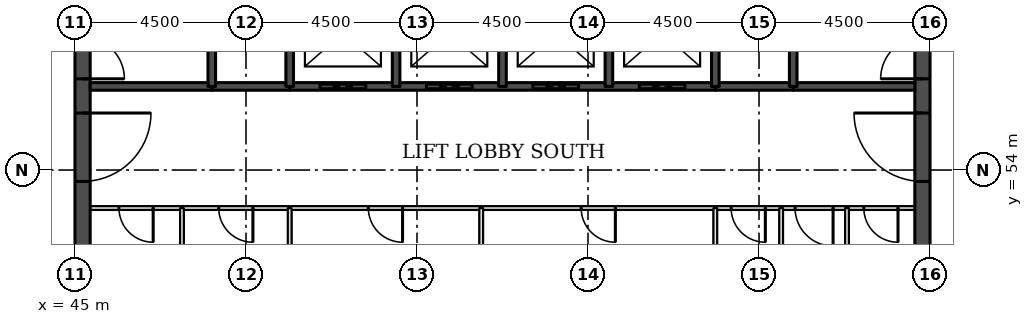
"""IFC4 building model, lengths in metres.
Left out: names, types, materials, properties, quantities, classifications, styles, units other than length and angle.
Written with IfcOpenShell. Run it as: python <this file> out.ifc"""

import sys

from ifc_helpers import new_model, si_unit, direction, frame, frame_2d, origin, place, context, subcontext, project, spatial, rectangle, extrude, element, fill, save


model = new_model("IFC4")
c1 = context("Model", 3, precision=1e-05, world=origin(), true_north=direction((0.0, 1.0)))
c2 = subcontext(c1, "Body", "Model", "MODEL_VIEW")
j1 = project(units=[si_unit("LENGTHUNIT", "METRE"), si_unit("PLANEANGLEUNIT", "RADIAN")], contexts=[c1])
p1 = place(None, origin())
s1 = spatial("IfcSite", under=j1, at=p1, CompositionType="ELEMENT")
p2 = place(p1, origin())
s2 = spatial("IfcBuilding", under=s1, at=p2, CompositionType="ELEMENT")
p3 = place(p2, frame((0.0, 0.0, 223.0)))
s3 = spatial("IfcBuildingStorey", under=s2, at=p3, CompositionType="ELEMENT", Elevation=223.0)
p4 = place(p3, frame((45.2, 49.5, 0.0), z_axis=(0.0, 0.0, 1.0), x_axis=(0.0, 1.0, 0.0)))
e1 = element("IfcWall", 1, at=p4, inside=s3, PredefinedType="SHEAR", context=c2, shape_type="SweptSolid", body=[
    extrude(rectangle(XDim=22.5, YDim=0.4, at=frame_2d((11.25, 0.0))), origin(), (0.0, 0.0, 1.0), 3.7),
])
p5 = place(p4, frame((4.2, 0.0, 0.0)))
e2 = element("IfcOpeningElement", 2, at=p5, cuts=e1, PredefinedType="OPENING", context=c2, shape_type="SweptSolid", body=[
    extrude(rectangle(XDim=1.8, YDim=2.1, at=frame_2d((0.9, 1.05))), frame((0.0, 0.21, 0.0), z_axis=(0.0, -1.0, 0.0), x_axis=(1.0, 0.0, 0.0)), (0.0, 0.0, 1.0), 0.42),
])
p6 = place(p4, frame((6.9, 0.0, 0.0)))
e3 = element("IfcOpeningElement", 3, at=p6, cuts=e1, PredefinedType="OPENING", context=c2, shape_type="SweptSolid", body=[
    extrude(rectangle(XDim=1.1, YDim=2.1, at=frame_2d((0.55, 1.05))), frame((0.0, 0.21, 0.0), z_axis=(0.0, -1.0, 0.0), x_axis=(1.0, 0.0, 0.0)), (0.0, 0.0, 1.0), 0.42),
])
p7 = place(p4, frame((13.6, 0.0, 0.0)))
e4 = element("IfcOpeningElement", 4, at=p7, cuts=e1, PredefinedType="OPENING", context=c2, shape_type="SweptSolid", body=[
    extrude(rectangle(XDim=1.1, YDim=2.1, at=frame_2d((0.55, 1.05))), frame((0.0, 0.21, 0.0), z_axis=(0.0, -1.0, 0.0), x_axis=(1.0, 0.0, 0.0)), (0.0, 0.0, 1.0), 0.42),
])
p8 = place(p4, frame((16.5, 0.0, 0.0)))
e5 = element("IfcOpeningElement", 5, at=p8, cuts=e1, PredefinedType="OPENING", context=c2, shape_type="SweptSolid", body=[
    extrude(rectangle(XDim=1.8, YDim=2.1, at=frame_2d((0.9, 1.05))), frame((0.0, 0.21, 0.0), z_axis=(0.0, -1.0, 0.0), x_axis=(1.0, 0.0, 0.0)), (0.0, 0.0, 1.0), 0.42),
])
p9 = place(p3, frame((67.3, 49.5, 0.0), z_axis=(0.0, 0.0, 1.0), x_axis=(0.0, 1.0, 0.0)))
e6 = element("IfcWall", 6, at=p9, inside=s3, PredefinedType="SHEAR", context=c2, shape_type="SweptSolid", body=[
    extrude(rectangle(XDim=22.5, YDim=0.4, at=frame_2d((11.25, 0.0))), origin(), (0.0, 0.0, 1.0), 3.7),
])
p10 = place(p9, frame((4.2, 0.0, 0.0)))
e7 = element("IfcOpeningElement", 7, at=p10, cuts=e6, PredefinedType="OPENING", context=c2, shape_type="SweptSolid", body=[
    extrude(rectangle(XDim=1.8, YDim=2.1, at=frame_2d((0.9, 1.05))), frame((0.0, 0.21, 0.0), z_axis=(0.0, -1.0, 0.0), x_axis=(1.0, 0.0, 0.0)), (0.0, 0.0, 1.0), 0.42),
])
p11 = place(p9, frame((6.9, 0.0, 0.0)))
e8 = element("IfcOpeningElement", 8, at=p11, cuts=e6, PredefinedType="OPENING", context=c2, shape_type="SweptSolid", body=[
    extrude(rectangle(XDim=1.1, YDim=2.1, at=frame_2d((0.55, 1.05))), frame((0.0, 0.21, 0.0), z_axis=(0.0, -1.0, 0.0), x_axis=(1.0, 0.0, 0.0)), (0.0, 0.0, 1.0), 0.42),
])
p12 = place(p9, frame((13.6, 0.0, 0.0)))
e9 = element("IfcOpeningElement", 9, at=p12, cuts=e6, PredefinedType="OPENING", context=c2, shape_type="SweptSolid", body=[
    extrude(rectangle(XDim=1.1, YDim=2.1, at=frame_2d((0.55, 1.05))), frame((0.0, 0.21, 0.0), z_axis=(0.0, -1.0, 0.0), x_axis=(1.0, 0.0, 0.0)), (0.0, 0.0, 1.0), 0.42),
])
p13 = place(p9, frame((16.5, 0.0, 0.0)))
e10 = element("IfcOpeningElement", 10, at=p13, cuts=e6, PredefinedType="OPENING", context=c2, shape_type="SweptSolid", body=[
    extrude(rectangle(XDim=1.8, YDim=2.1, at=frame_2d((0.9, 1.05))), frame((0.0, 0.21, 0.0), z_axis=(0.0, -1.0, 0.0), x_axis=(1.0, 0.0, 0.0)), (0.0, 0.0, 1.0), 0.42),
])
p14 = place(p3, frame((45.4, 53.0, 0.0), z_axis=(0.0, 0.0, 1.0), x_axis=(1.0, 0.0, 0.0)))
e11 = element("IfcWall", 11, at=p14, inside=s3, PredefinedType="PARTITIONING", context=c2, shape_type="SweptSolid", body=[
    extrude(rectangle(XDim=21.7, YDim=0.1, at=frame_2d((10.85, 0.0))), origin(), (0.0, 0.0, 1.0), 3.55),
])
p15 = place(p14, frame((20.357, 0.0, 0.0)))
e12 = element("IfcOpeningElement", 12, at=p15, cuts=e11, PredefinedType="OPENING", context=c2, shape_type="SweptSolid", body=[
    extrude(rectangle(XDim=0.9, YDim=2.1, at=frame_2d((0.45, 1.05))), frame((0.0, 0.06, 0.0), z_axis=(0.0, -1.0, 0.0), x_axis=(1.0, 0.0, 0.0)), (0.0, 0.0, 1.0), 0.12),
])
p16 = place(p14, frame((18.549, 0.0, 0.0)))
e13 = element("IfcOpeningElement", 13, at=p16, cuts=e11, PredefinedType="OPENING", context=c2, shape_type="SweptSolid", body=[
    extrude(rectangle(XDim=1.0, YDim=2.1, at=frame_2d((0.5, 1.05))), frame((0.0, 0.06, 0.0), z_axis=(0.0, -1.0, 0.0), x_axis=(1.0, 0.0, 0.0)), (0.0, 0.0, 1.0), 0.12),
])
p17 = place(p14, frame((16.866, 0.0, 0.0)))
e14 = element("IfcOpeningElement", 14, at=p17, cuts=e11, PredefinedType="OPENING", context=c2, shape_type="SweptSolid", body=[
    extrude(rectangle(XDim=0.9, YDim=2.1, at=frame_2d((0.45, 1.05))), frame((0.0, 0.06, 0.0), z_axis=(0.0, -1.0, 0.0), x_axis=(1.0, 0.0, 0.0)), (0.0, 0.0, 1.0), 0.12),
])
p18 = place(p14, frame((0.758, 0.0, 0.0)))
e15 = element("IfcOpeningElement", 15, at=p18, cuts=e11, PredefinedType="OPENING", context=c2, shape_type="SweptSolid", body=[
    extrude(rectangle(XDim=0.9, YDim=2.1, at=frame_2d((0.45, 1.05))), frame((0.0, 0.06, 0.0), z_axis=(0.0, -1.0, 0.0), x_axis=(1.0, 0.0, 0.0)), (0.0, 0.0, 1.0), 0.12),
])
p19 = place(p14, frame((3.383, 0.0, 0.0)))
e16 = element("IfcOpeningElement", 16, at=p19, cuts=e11, PredefinedType="OPENING", context=c2, shape_type="SweptSolid", body=[
    extrude(rectangle(XDim=0.9, YDim=2.1, at=frame_2d((0.45, 1.05))), frame((0.0, 0.06, 0.0), z_axis=(0.0, -1.0, 0.0), x_axis=(1.0, 0.0, 0.0)), (0.0, 0.0, 1.0), 0.12),
])
p20 = place(p14, frame((7.32, 0.0, 0.0)))
e17 = element("IfcOpeningElement", 17, at=p20, cuts=e11, PredefinedType="OPENING", context=c2, shape_type="SweptSolid", body=[
    extrude(rectangle(XDim=0.9, YDim=2.1, at=frame_2d((0.45, 1.05))), frame((0.0, 0.06, 0.0), z_axis=(0.0, -1.0, 0.0), x_axis=(1.0, 0.0, 0.0)), (0.0, 0.0, 1.0), 0.12),
])
p21 = place(p14, frame((12.92, 0.0, 0.0)))
e18 = element("IfcOpeningElement", 18, at=p21, cuts=e11, PredefinedType="OPENING", context=c2, shape_type="SweptSolid", body=[
    extrude(rectangle(XDim=0.9, YDim=2.1, at=frame_2d((0.45, 1.05))), frame((0.0, 0.06, 0.0), z_axis=(0.0, -1.0, 0.0), x_axis=(1.0, 0.0, 0.0)), (0.0, 0.0, 1.0), 0.12),
])
for number, where, z_axis, x_axis in (
    (19, (48.6, 56.2, 0.0), (0.0, 0.0, 1.0), (1.0, 0.0, 0.0)),
    (20, (61.85, 56.2, 0.0), (0.0, 0.0, 1.0), (1.0, 0.0, 0.0)),
):
    element("IfcWall", number, at=place(p3, frame(where, z_axis=z_axis, x_axis=x_axis)), inside=s3, PredefinedType="SOLIDWALL", context=c2, shape_type="SweptSolid", body=[
        extrude(rectangle(XDim=2.05, YDim=0.2, at=frame_2d((1.025, 0.0))), origin(), (0.0, 0.0, 1.0), 3.55),
    ])
p22 = place(p3, frame((45.4, 56.2, 0.0), z_axis=(0.0, 0.0, 1.0), x_axis=(1.0, 0.0, 0.0)))
e21 = element("IfcWall", 21, at=p22, inside=s3, PredefinedType="SOLIDWALL", context=c2, shape_type="SweptSolid", body=[
    extrude(rectangle(XDim=3.2, YDim=0.2, at=frame_2d((1.6, 0.0))), origin(), (0.0, 0.0, 1.0), 3.55),
])
p23 = place(p3, frame((50.65, 56.2, 0.0), z_axis=(0.0, 0.0, 1.0), x_axis=(1.0, 0.0, 0.0)))
e22 = element("IfcWall", 22, at=p23, inside=s3, PredefinedType="SOLIDWALL", context=c2, shape_type="SweptSolid", body=[
    extrude(rectangle(XDim=11.2, YDim=0.2, at=frame_2d((5.6, 0.0))), origin(), (0.0, 0.0, 1.0), 3.55),
])
p24 = place(p23, frame((0.8, 0.0, 0.0)))
e23 = element("IfcOpeningElement", 23, at=p24, cuts=e22, PredefinedType="OPENING", context=c2, shape_type="SweptSolid", body=[
    extrude(rectangle(XDim=1.2, YDim=2.1, at=frame_2d((0.6, 1.05))), frame((0.0, 0.11, 0.0), z_axis=(0.0, -1.0, 0.0), x_axis=(1.0, 0.0, 0.0)), (0.0, 0.0, 1.0), 0.22),
])
p25 = place(p23, frame((3.6, 0.0, 0.0)))
e24 = element("IfcOpeningElement", 24, at=p25, cuts=e22, PredefinedType="OPENING", context=c2, shape_type="SweptSolid", body=[
    extrude(rectangle(XDim=1.2, YDim=2.1, at=frame_2d((0.6, 1.05))), frame((0.0, 0.11, 0.0), z_axis=(0.0, -1.0, 0.0), x_axis=(1.0, 0.0, 0.0)), (0.0, 0.0, 1.0), 0.22),
])
p26 = place(p23, frame((6.4, 0.0, 0.0)))
e25 = element("IfcOpeningElement", 25, at=p26, cuts=e22, PredefinedType="OPENING", context=c2, shape_type="SweptSolid", body=[
    extrude(rectangle(XDim=1.2, YDim=2.1, at=frame_2d((0.6, 1.05))), frame((0.0, 0.11, 0.0), z_axis=(0.0, -1.0, 0.0), x_axis=(1.0, 0.0, 0.0)), (0.0, 0.0, 1.0), 0.22),
])
p27 = place(p23, frame((9.2, 0.0, 0.0)))
e26 = element("IfcOpeningElement", 26, at=p27, cuts=e22, PredefinedType="OPENING", context=c2, shape_type="SweptSolid", body=[
    extrude(rectangle(XDim=1.2, YDim=2.1, at=frame_2d((0.6, 1.05))), frame((0.0, 0.11, 0.0), z_axis=(0.0, -1.0, 0.0), x_axis=(1.0, 0.0, 0.0)), (0.0, 0.0, 1.0), 0.22),
])
p28 = place(p3, frame((63.9, 56.2, 0.0), z_axis=(0.0, 0.0, 1.0), x_axis=(1.0, 0.0, 0.0)))
e27 = element("IfcWall", 27, at=p28, inside=s3, PredefinedType="SOLIDWALL", context=c2, shape_type="SweptSolid", body=[
    extrude(rectangle(XDim=3.2, YDim=0.2, at=frame_2d((1.6, 0.0))), origin(), (0.0, 0.0, 1.0), 3.55),
])
p29 = place(p3, frame((47.815, 49.9, 0.0), z_axis=(0.0, 0.0, 1.0), x_axis=(0.0, 1.0, 0.0)))
e28 = element("IfcWall", 28, at=p29, inside=s3, PredefinedType="PARTITIONING", context=c2, shape_type="SweptSolid", body=[
    extrude(rectangle(XDim=3.1, YDim=0.1, at=frame_2d((1.55, 0.0))), origin(), (0.0, 0.0, 1.0), 3.55),
])
p30 = place(p3, frame((48.6, 56.2, 0.0), z_axis=(0.0, 0.0, 1.0), x_axis=(0.0, 1.0, 0.0)))
e29 = element("IfcWall", 29, at=p30, inside=s3, PredefinedType="SOLIDWALL", context=c2, shape_type="SweptSolid", body=[
    extrude(rectangle(XDim=5.8, YDim=0.2, at=frame_2d((2.9, 0.0))), origin(), (0.0, 0.0, 1.0), 3.55),
])
p31 = place(p3, frame((50.65, 49.9, 0.0), z_axis=(0.0, 0.0, 1.0), x_axis=(0.0, 1.0, 0.0)))
e30 = element("IfcWall", 30, at=p31, inside=s3, PredefinedType="PARTITIONING", context=c2, shape_type="SweptSolid", body=[
    extrude(rectangle(XDim=3.1, YDim=0.1, at=frame_2d((1.55, 0.0))), origin(), (0.0, 0.0, 1.0), 3.55),
])
for number, where, z_axis, x_axis in (
    (31, (50.65, 56.2, 0.0), (0.0, 0.0, 1.0), (0.0, 1.0, 0.0)),
    (32, (53.45, 56.2, 0.0), (0.0, 0.0, 1.0), (0.0, 1.0, 0.0)),
):
    element("IfcWall", number, at=place(p3, frame(where, z_axis=z_axis, x_axis=x_axis)), inside=s3, PredefinedType="SOLIDWALL", context=c2, shape_type="SweptSolid", body=[
        extrude(rectangle(XDim=2.8, YDim=0.2, at=frame_2d((1.4, 0.0))), origin(), (0.0, 0.0, 1.0), 3.55),
    ])
p32 = place(p3, frame((55.69, 49.9, 0.0), z_axis=(0.0, 0.0, 1.0), x_axis=(0.0, 1.0, 0.0)))
e33 = element("IfcWall", 33, at=p32, inside=s3, PredefinedType="PARTITIONING", context=c2, shape_type="SweptSolid", body=[
    extrude(rectangle(XDim=3.1, YDim=0.1, at=frame_2d((1.55, 0.0))), origin(), (0.0, 0.0, 1.0), 3.55),
])
for number, where, z_axis, x_axis in (
    (34, (56.25, 56.2, 0.0), (0.0, 0.0, 1.0), (0.0, 1.0, 0.0)),
    (35, (59.05, 56.2, 0.0), (0.0, 0.0, 1.0), (0.0, 1.0, 0.0)),
):
    element("IfcWall", number, at=place(p3, frame(where, z_axis=z_axis, x_axis=x_axis)), inside=s3, PredefinedType="SOLIDWALL", context=c2, shape_type="SweptSolid", body=[
        extrude(rectangle(XDim=2.8, YDim=0.2, at=frame_2d((1.4, 0.0))), origin(), (0.0, 0.0, 1.0), 3.55),
    ])
p33 = place(p3, frame((61.85, 49.9, 0.0), z_axis=(0.0, 0.0, 1.0), x_axis=(0.0, 1.0, 0.0)))
e36 = element("IfcWall", 36, at=p33, inside=s3, PredefinedType="PARTITIONING", context=c2, shape_type="SweptSolid", body=[
    extrude(rectangle(XDim=3.1, YDim=0.1, at=frame_2d((1.55, 0.0))), origin(), (0.0, 0.0, 1.0), 3.55),
])
p34 = place(p3, frame((61.85, 56.2, 0.0), z_axis=(0.0, 0.0, 1.0), x_axis=(0.0, 1.0, 0.0)))
e37 = element("IfcWall", 37, at=p34, inside=s3, PredefinedType="SOLIDWALL", context=c2, shape_type="SweptSolid", body=[
    extrude(rectangle(XDim=2.8, YDim=0.2, at=frame_2d((1.4, 0.0))), origin(), (0.0, 0.0, 1.0), 3.55),
])
p35 = place(p3, frame((63.583, 49.9, 0.0), z_axis=(0.0, 0.0, 1.0), x_axis=(0.0, 1.0, 0.0)))
e38 = element("IfcWall", 38, at=p35, inside=s3, PredefinedType="PARTITIONING", context=c2, shape_type="SweptSolid", body=[
    extrude(rectangle(XDim=3.1, YDim=0.1, at=frame_2d((1.55, 0.0))), origin(), (0.0, 0.0, 1.0), 3.55),
])
p36 = place(p3, frame((63.9, 56.2, 0.0), z_axis=(0.0, 0.0, 1.0), x_axis=(0.0, 1.0, 0.0)))
e39 = element("IfcWall", 39, at=p36, inside=s3, PredefinedType="SOLIDWALL", context=c2, shape_type="SweptSolid", body=[
    extrude(rectangle(XDim=5.8, YDim=0.2, at=frame_2d((2.9, 0.0))), origin(), (0.0, 0.0, 1.0), 3.55),
])
p37 = place(p3, frame((65.315, 49.9, 0.0), z_axis=(0.0, 0.0, 1.0), x_axis=(0.0, 1.0, 0.0)))
e40 = element("IfcWall", 40, at=p37, inside=s3, PredefinedType="PARTITIONING", context=c2, shape_type="SweptSolid", body=[
    extrude(rectangle(XDim=3.1, YDim=0.1, at=frame_2d((1.55, 0.0))), origin(), (0.0, 0.0, 1.0), 3.55),
])
p38 = place(p24, origin())
e41 = element("IfcDoor", 41, at=p38, inside=s3, OperationType="DOUBLE_DOOR_SLIDING", PredefinedType="DOOR", context=c2, shape_type="SweptSolid", body=[
    extrude(rectangle(XDim=1.2, YDim=2.1, at=frame_2d((0.6, 1.05))), frame((0.0, 0.025, 0.0), z_axis=(0.0, -1.0, 0.0), x_axis=(1.0, 0.0, 0.0)), (0.0, 0.0, 1.0), 0.05),
])
fill(e23, e41)
p39 = place(p25, origin())
e42 = element("IfcDoor", 42, at=p39, inside=s3, OperationType="DOUBLE_DOOR_SLIDING", PredefinedType="DOOR", context=c2, shape_type="SweptSolid", body=[
    extrude(rectangle(XDim=1.2, YDim=2.1, at=frame_2d((0.6, 1.05))), frame((0.0, 0.025, 0.0), z_axis=(0.0, -1.0, 0.0), x_axis=(1.0, 0.0, 0.0)), (0.0, 0.0, 1.0), 0.05),
])
fill(e24, e42)
p40 = place(p26, origin())
e43 = element("IfcDoor", 43, at=p40, inside=s3, OperationType="DOUBLE_DOOR_SLIDING", PredefinedType="DOOR", context=c2, shape_type="SweptSolid", body=[
    extrude(rectangle(XDim=1.2, YDim=2.1, at=frame_2d((0.6, 1.05))), frame((0.0, 0.025, 0.0), z_axis=(0.0, -1.0, 0.0), x_axis=(1.0, 0.0, 0.0)), (0.0, 0.0, 1.0), 0.05),
])
fill(e25, e43)
p41 = place(p27, origin())
e44 = element("IfcDoor", 44, at=p41, inside=s3, OperationType="DOUBLE_DOOR_SLIDING", PredefinedType="DOOR", context=c2, shape_type="SweptSolid", body=[
    extrude(rectangle(XDim=1.2, YDim=2.1, at=frame_2d((0.6, 1.05))), frame((0.0, 0.025, 0.0), z_axis=(0.0, -1.0, 0.0), x_axis=(1.0, 0.0, 0.0)), (0.0, 0.0, 1.0), 0.05),
])
fill(e26, e44)
p42 = place(p5, frame((1.8, 0.0, 0.0), z_axis=(0.0, 0.0, 1.0), x_axis=(-1.0, 0.0, 0.0)))
e45 = element("IfcDoor", 45, at=p42, inside=s3, OperationType="SINGLE_SWING_LEFT", PredefinedType="DOOR", context=c2, shape_type="SweptSolid", body=[
    extrude(rectangle(XDim=1.8, YDim=2.1, at=frame_2d((0.9, 1.05))), frame((0.0, 0.025, 0.0), z_axis=(0.0, -1.0, 0.0), x_axis=(1.0, 0.0, 0.0)), (0.0, 0.0, 1.0), 0.05),
])
fill(e2, e45)
p43 = place(p6, frame((1.1, 0.0, 0.0), z_axis=(0.0, 0.0, 1.0), x_axis=(-1.0, 0.0, 0.0)))
e46 = element("IfcDoor", 46, at=p43, inside=s3, OperationType="SINGLE_SWING_RIGHT", PredefinedType="DOOR", context=c2, shape_type="SweptSolid", body=[
    extrude(rectangle(XDim=1.1, YDim=2.1, at=frame_2d((0.55, 1.05))), frame((0.0, 0.025, 0.0), z_axis=(0.0, -1.0, 0.0), x_axis=(1.0, 0.0, 0.0)), (0.0, 0.0, 1.0), 0.05),
])
fill(e3, e46)
p44 = place(p10, origin())
e47 = element("IfcDoor", 47, at=p44, inside=s3, OperationType="SINGLE_SWING_RIGHT", PredefinedType="DOOR", context=c2, shape_type="SweptSolid", body=[
    extrude(rectangle(XDim=1.8, YDim=2.1, at=frame_2d((0.9, 1.05))), frame((0.0, 0.025, 0.0), z_axis=(0.0, -1.0, 0.0), x_axis=(1.0, 0.0, 0.0)), (0.0, 0.0, 1.0), 0.05),
])
fill(e7, e47)
p45 = place(p11, origin())
e48 = element("IfcDoor", 48, at=p45, inside=s3, OperationType="SINGLE_SWING_LEFT", PredefinedType="DOOR", context=c2, shape_type="SweptSolid", body=[
    extrude(rectangle(XDim=1.1, YDim=2.1, at=frame_2d((0.55, 1.05))), frame((0.0, 0.025, 0.0), z_axis=(0.0, -1.0, 0.0), x_axis=(1.0, 0.0, 0.0)), (0.0, 0.0, 1.0), 0.05),
])
fill(e8, e48)
p46 = place(p15, frame((0.9, 0.0, 0.0), z_axis=(0.0, 0.0, 1.0), x_axis=(-1.0, 0.0, 0.0)))
e49 = element("IfcDoor", 49, at=p46, inside=s3, OperationType="SINGLE_SWING_LEFT", PredefinedType="DOOR", context=c2, shape_type="SweptSolid", body=[
    extrude(rectangle(XDim=0.9, YDim=2.1, at=frame_2d((0.45, 1.05))), frame((0.0, 0.025, 0.0), z_axis=(0.0, -1.0, 0.0), x_axis=(1.0, 0.0, 0.0)), (0.0, 0.0, 1.0), 0.05),
])
fill(e12, e49)
p47 = place(p16, frame((1.0, 0.0, 0.0), z_axis=(0.0, 0.0, 1.0), x_axis=(-1.0, 0.0, 0.0)))
e50 = element("IfcDoor", 50, at=p47, inside=s3, OperationType="SINGLE_SWING_LEFT", PredefinedType="DOOR", context=c2, shape_type="SweptSolid", body=[
    extrude(rectangle(XDim=1.0, YDim=2.1, at=frame_2d((0.5, 1.05))), frame((0.0, 0.025, 0.0), z_axis=(0.0, -1.0, 0.0), x_axis=(1.0, 0.0, 0.0)), (0.0, 0.0, 1.0), 0.05),
])
fill(e13, e50)
p48 = place(p17, frame((0.9, 0.0, 0.0), z_axis=(0.0, 0.0, 1.0), x_axis=(-1.0, 0.0, 0.0)))
e51 = element("IfcDoor", 51, at=p48, inside=s3, OperationType="SINGLE_SWING_LEFT", PredefinedType="DOOR", context=c2, shape_type="SweptSolid", body=[
    extrude(rectangle(XDim=0.9, YDim=2.1, at=frame_2d((0.45, 1.05))), frame((0.0, 0.025, 0.0), z_axis=(0.0, -1.0, 0.0), x_axis=(1.0, 0.0, 0.0)), (0.0, 0.0, 1.0), 0.05),
])
fill(e14, e51)
p49 = place(p18, frame((0.9, 0.0, 0.0), z_axis=(0.0, 0.0, 1.0), x_axis=(-1.0, 0.0, 0.0)))
e52 = element("IfcDoor", 52, at=p49, inside=s3, OperationType="SINGLE_SWING_LEFT", PredefinedType="DOOR", context=c2, shape_type="SweptSolid", body=[
    extrude(rectangle(XDim=0.9, YDim=2.1, at=frame_2d((0.45, 1.05))), frame((0.0, 0.025, 0.0), z_axis=(0.0, -1.0, 0.0), x_axis=(1.0, 0.0, 0.0)), (0.0, 0.0, 1.0), 0.05),
])
fill(e15, e52)
p50 = place(p19, frame((0.9, 0.0, 0.0), z_axis=(0.0, 0.0, 1.0), x_axis=(-1.0, 0.0, 0.0)))
e53 = element("IfcDoor", 53, at=p50, inside=s3, OperationType="SINGLE_SWING_LEFT", PredefinedType="DOOR", context=c2, shape_type="SweptSolid", body=[
    extrude(rectangle(XDim=0.9, YDim=2.1, at=frame_2d((0.45, 1.05))), frame((0.0, 0.025, 0.0), z_axis=(0.0, -1.0, 0.0), x_axis=(1.0, 0.0, 0.0)), (0.0, 0.0, 1.0), 0.05),
])
fill(e16, e53)
p51 = place(p20, frame((0.9, 0.0, 0.0), z_axis=(0.0, 0.0, 1.0), x_axis=(-1.0, 0.0, 0.0)))
e54 = element("IfcDoor", 54, at=p51, inside=s3, OperationType="SINGLE_SWING_LEFT", PredefinedType="DOOR", context=c2, shape_type="SweptSolid", body=[
    extrude(rectangle(XDim=0.9, YDim=2.1, at=frame_2d((0.45, 1.05))), frame((0.0, 0.025, 0.0), z_axis=(0.0, -1.0, 0.0), x_axis=(1.0, 0.0, 0.0)), (0.0, 0.0, 1.0), 0.05),
])
fill(e17, e54)
p52 = place(p21, frame((0.9, 0.0, 0.0), z_axis=(0.0, 0.0, 1.0), x_axis=(-1.0, 0.0, 0.0)))
e55 = element("IfcDoor", 55, at=p52, inside=s3, OperationType="SINGLE_SWING_LEFT", PredefinedType="DOOR", context=c2, shape_type="SweptSolid", body=[
    extrude(rectangle(XDim=0.9, YDim=2.1, at=frame_2d((0.45, 1.05))), frame((0.0, 0.025, 0.0), z_axis=(0.0, -1.0, 0.0), x_axis=(1.0, 0.0, 0.0)), (0.0, 0.0, 1.0), 0.05),
])
fill(e18, e55)
save(model, sys.argv[1])
